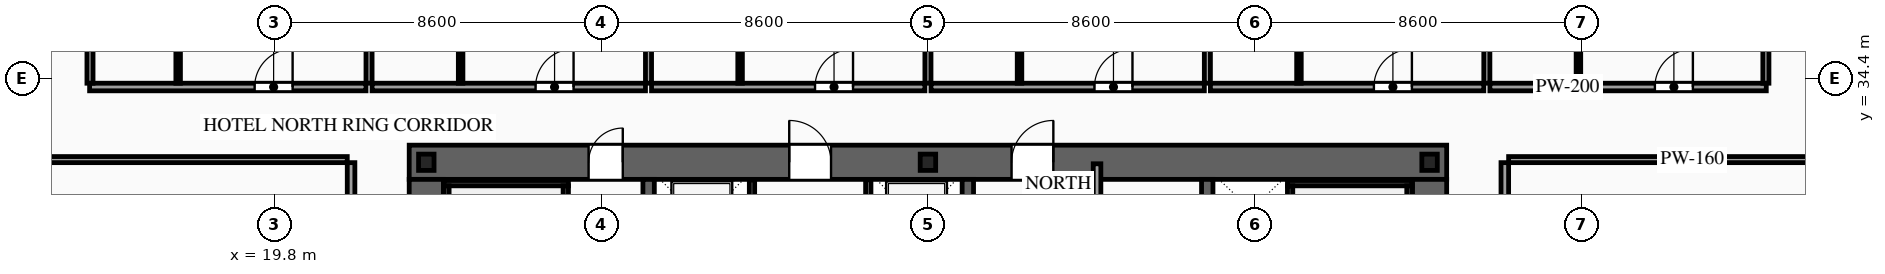
"""IFC4 building model, lengths in metres.
Left out: names, types, materials, properties, quantities, classifications, styles, units other than length and angle.
Written with IfcOpenShell. Run it as: python <this file> out.ifc"""

import sys

from ifc_helpers import new_model, si_unit, direction, frame, frame_2d, origin, origin_2d, place, context, subcontext, project, spatial, rectangle, i_section, extrude, source, transform, mapped, element, fill, save


model = new_model("IFC4")
c1 = context("Model", 3, precision=1e-05, world=origin(), true_north=direction((0.0, 1.0)))
c2 = subcontext(c1, "Body", "Model", "MODEL_VIEW")
j1 = project(units=[si_unit("LENGTHUNIT", "METRE"), si_unit("PLANEANGLEUNIT", "RADIAN")], contexts=[c1])
p1 = place(None, origin())
s1 = spatial("IfcSite", under=j1, at=p1, CompositionType="ELEMENT")
p2 = place(p1, origin())
s2 = spatial("IfcBuilding", under=s1, at=p2, CompositionType="ELEMENT")
p3 = place(p2, frame((0.0, 0.0, 30.6)))
s3 = spatial("IfcBuildingStorey", under=s2, at=p3, CompositionType="ELEMENT", Elevation=30.6)
p4 = place(p3, frame((23.35, 32.2, 0.0), z_axis=(0.0, 0.0, 1.0), x_axis=(1.0, 0.0, 0.0)))
e1 = element("IfcWall", 1, at=p4, inside=s3, PredefinedType="SHEAR", context=c2, shape_type="SweptSolid", body=[
    extrude(rectangle(XDim=27.3, YDim=0.9, at=frame_2d((13.65, 0.0))), origin(), (0.0, 0.0, 1.0), 3.6),
])
p5 = place(p4, frame((4.72, 0.0, 0.0)))
e2 = element("IfcOpeningElement", 2, at=p5, cuts=e1, PredefinedType="OPENING", context=c2, shape_type="SweptSolid", body=[
    extrude(rectangle(XDim=0.9, YDim=2.15, at=frame_2d((0.45, 1.075))), frame((0.0, 0.465, 0.0), z_axis=(0.0, -1.0, 0.0), x_axis=(1.0, 0.0, 0.0)), (0.0, 0.0, 1.0), 0.93),
])
p6 = place(p4, frame((10.0, 0.0, 0.0)))
e3 = element("IfcOpeningElement", 3, at=p6, cuts=e1, PredefinedType="OPENING", context=c2, shape_type="SweptSolid", body=[
    extrude(rectangle(XDim=1.1, YDim=2.2, at=frame_2d((0.55, 1.1))), frame((0.0, 0.465, 0.0), z_axis=(0.0, -1.0, 0.0), x_axis=(1.0, 0.0, 0.0)), (0.0, 0.0, 1.0), 0.93),
])
p7 = place(p4, frame((15.85, 0.0, 0.0)))
e4 = element("IfcOpeningElement", 4, at=p7, cuts=e1, PredefinedType="OPENING", context=c2, shape_type="SweptSolid", body=[
    extrude(rectangle(XDim=1.1, YDim=2.2, at=frame_2d((0.55, 1.1))), frame((0.0, 0.465, 0.0), z_axis=(0.0, -1.0, 0.0), x_axis=(1.0, 0.0, 0.0)), (0.0, 0.0, 1.0), 0.93),
])
m1 = source(origin(), c2, "Body", "SweptSolid", [
    extrude(rectangle(XDim=11.9, YDim=0.9, at=frame_2d((5.95, 0.0))), origin(), (0.0, 0.0, 1.0), 3.6),
])
for number, where, z_axis, x_axis in (
    (5, (23.8, 19.85, 0.0), (0.0, 0.0, 1.0), (0.0, 1.0, 0.0)),
    (6, (50.2, 19.85, 0.0), (0.0, 0.0, 1.0), (0.0, 1.0, 0.0)),
):
    element("IfcWall", number, at=place(p3, frame(where, z_axis=z_axis, x_axis=x_axis)), inside=s3, PredefinedType="SHEAR", context=c2, shape_type="MappedRepresentation", body=[
        mapped(m1, transform((0.0, 0.0, 0.0), scale=1.0)),
    ])
m2 = source(origin(), c2, "Body", "SweptSolid", [
    extrude(rectangle(XDim=11.9, YDim=0.3, at=frame_2d((5.95, 0.0))), origin(), (0.0, 0.0, 1.0), 3.6),
])
for number, where, z_axis, x_axis in (
    (7, (29.65, 19.85, 0.0), (0.0, 0.0, 1.0), (0.0, 1.0, 0.0)),
    (8, (38.05, 19.85, 0.0), (0.0, 0.0, 1.0), (0.0, 1.0, 0.0)),
    (9, (44.35, 19.85, 0.0), (0.0, 0.0, 1.0), (0.0, 1.0, 0.0)),
):
    element("IfcWall", number, at=place(p3, frame(where, z_axis=z_axis, x_axis=x_axis)), inside=s3, PredefinedType="SOLIDWALL", context=c2, shape_type="MappedRepresentation", body=[
        mapped(m2, transform((0.0, 0.0, 0.0), scale=1.0)),
    ])
m3 = source(origin(), c2, "Body", "SweptSolid", [
    extrude(i_section(OverallWidth=0.407, OverallDepth=0.428, WebThickness=0.02, FlangeThickness=0.035, at=origin_2d()), origin(), (0.0, 0.0, 1.0), 3.6),
])
for number, where, z_axis, x_axis in (
    (10, (23.8, 32.2, 0.0), (0.0, 0.0, 1.0), (1.0, 0.0, 0.0)),
    (11, (37.0, 32.2, 0.0), (0.0, 0.0, 1.0), (1.0, 0.0, 0.0)),
    (12, (50.2, 32.2, 0.0), (0.0, 0.0, 1.0), (1.0, 0.0, 0.0)),
):
    element("IfcColumn", number, at=place(p3, frame(where, z_axis=z_axis, x_axis=x_axis)), inside=s3, PredefinedType="COLUMN", context=c2, shape_type="MappedRepresentation", body=[
        mapped(m3, transform((0.0, 0.0, 0.0), scale=1.0)),
    ])
p8 = place(p3, frame((32.37, 29.4, 0.0), z_axis=(0.0, 0.0, 1.0), x_axis=(0.0, 1.0, 0.0)))
e13 = element("IfcWall", 13, at=p8, inside=s3, PredefinedType="SOLIDWALL", context=c2, shape_type="SweptSolid", body=[
    extrude(rectangle(XDim=2.34, YDim=0.14, at=frame_2d((1.17, 0.0))), origin(), (0.0, 0.0, 1.0), 3.38),
])
p9 = place(p8, frame((0.62, 0.0, 0.0)))
e14 = element("IfcOpeningElement", 14, at=p9, cuts=e13, PredefinedType="OPENING", context=c2, shape_type="SweptSolid", body=[
    extrude(rectangle(XDim=1.1, YDim=2.2, at=frame_2d((0.55, 1.1))), frame((0.0, 0.085, 0.0), z_axis=(0.0, -1.0, 0.0), x_axis=(1.0, 0.0, 0.0)), (0.0, 0.0, 1.0), 0.17),
])
p10 = place(p3, frame((35.43, 29.4, 0.0), z_axis=(0.0, 0.0, 1.0), x_axis=(0.0, 1.0, 0.0)))
e15 = element("IfcWall", 15, at=p10, inside=s3, PredefinedType="SOLIDWALL", context=c2, shape_type="SweptSolid", body=[
    extrude(rectangle(XDim=2.34, YDim=0.14, at=frame_2d((1.17, 0.0))), origin(), (0.0, 0.0, 1.0), 3.38),
])
p11 = place(p10, frame((0.62, 0.0, 0.0)))
e16 = element("IfcOpeningElement", 16, at=p11, cuts=e15, PredefinedType="OPENING", context=c2, shape_type="SweptSolid", body=[
    extrude(rectangle(XDim=1.1, YDim=2.2, at=frame_2d((0.55, 1.1))), frame((0.0, 0.085, 0.0), z_axis=(0.0, -1.0, 0.0), x_axis=(1.0, 0.0, 0.0)), (0.0, 0.0, 1.0), 0.17),
])
m4 = source(origin(), c2, "Body", "SweptSolid", [
    extrude(rectangle(XDim=3.28, YDim=0.14, at=frame_2d((1.64, 0.0))), origin(), (0.0, 0.0, 1.0), 3.38),
])
p12 = place(p3, frame((24.26, 31.65, 0.0), z_axis=(0.0, 0.0, 1.0), x_axis=(1.0, 0.0, 0.0)))
e17 = element("IfcWall", 17, at=p12, inside=s3, PredefinedType="SOLIDWALL", context=c2, shape_type="MappedRepresentation", body=[
    mapped(m4, transform((0.0, 0.0, 0.0), scale=1.0)),
])
m5 = source(origin(), c2, "Body", "SweptSolid", [
    extrude(rectangle(XDim=8.94, YDim=0.14, at=frame_2d((4.47, 0.0))), origin(), (0.0, 0.0, 1.0), 3.38),
])
for number, where, z_axis, x_axis in (
    (18, (24.33, 22.64, 0.0), (0.0, 0.0, 1.0), (0.0, 1.0, 0.0)),
    (19, (27.47, 22.64, 0.0), (0.0, 0.0, 1.0), (0.0, 1.0, 0.0)),
):
    element("IfcWall", number, at=place(p3, frame(where, z_axis=z_axis, x_axis=x_axis)), inside=s3, PredefinedType="SOLIDWALL", context=c2, shape_type="MappedRepresentation", body=[
        mapped(m5, transform((0.0, 0.0, 0.0), scale=1.0)),
    ])
p13 = place(p3, frame((46.46, 31.65, 0.0), z_axis=(0.0, 0.0, 1.0), x_axis=(1.0, 0.0, 0.0)))
e20 = element("IfcWall", 20, at=p13, inside=s3, PredefinedType="SOLIDWALL", context=c2, shape_type="MappedRepresentation", body=[
    mapped(m4, transform((0.0, 0.0, 0.0), scale=1.0)),
])
for number, where, z_axis, x_axis in (
    (21, (46.53, 22.64, 0.0), (0.0, 0.0, 1.0), (0.0, 1.0, 0.0)),
    (22, (49.67, 22.64, 0.0), (0.0, 0.0, 1.0), (0.0, 1.0, 0.0)),
):
    element("IfcWall", number, at=place(p3, frame(where, z_axis=z_axis, x_axis=x_axis)), inside=s3, PredefinedType="SOLIDWALL", context=c2, shape_type="MappedRepresentation", body=[
        mapped(m5, transform((0.0, 0.0, 0.0), scale=1.0)),
    ])
m6 = source(origin(), c2, "Body", "SweptSolid", [
    extrude(rectangle(XDim=12.72, YDim=0.2, at=frame_2d((6.36, 0.0))), origin(), (0.0, 0.0, 1.0), 3.38),
])
p14 = place(p3, frame((41.45, 19.44, 0.0), z_axis=(0.0, 0.0, 1.0), x_axis=(0.0, 1.0, 0.0)))
e23 = element("IfcWall", 23, at=p14, inside=s3, PredefinedType="PARTITIONING", context=c2, shape_type="MappedRepresentation", body=[
    mapped(m6, transform((0.0, 0.0, 0.0), scale=1.0)),
])
p15 = place(p3, frame((14.94, 34.18, 0.0), z_axis=(0.0, 0.0, 1.0), x_axis=(1.0, 0.0, 0.0)))
e24 = element("IfcWall", 24, at=p15, inside=s3, PredefinedType="PARTITIONING", context=c2, shape_type="SweptSolid", body=[
    extrude(rectangle(XDim=7.273, YDim=0.2, at=frame_2d((3.636, 0.0))), origin(), (0.0, 0.0, 1.0), 3.38),
])
p16 = place(p15, frame((4.342, 0.0, 0.0)))
e25 = element("IfcOpeningElement", 25, at=p16, cuts=e24, PredefinedType="OPENING", context=c2, shape_type="SweptSolid", body=[
    extrude(rectangle(XDim=1.0, YDim=2.2, at=frame_2d((0.5, 1.1))), frame((0.0, 0.115, 0.0), z_axis=(0.0, -1.0, 0.0), x_axis=(1.0, 0.0, 0.0)), (0.0, 0.0, 1.0), 0.23),
])
m7 = source(origin(), c2, "Body", "SweptSolid", [
    extrude(rectangle(XDim=16.47, YDim=0.16, at=frame_2d((8.235, 0.0))), origin(), (0.0, 0.0, 1.0), 3.38),
])
p17 = place(p3, frame((22.293, 34.28, 0.0), z_axis=(0.0, 0.0, 1.0), x_axis=(0.0, 1.0, 0.0)))
e26 = element("IfcWall", 26, at=p17, inside=s3, PredefinedType="PARTITIONING", context=c2, shape_type="MappedRepresentation", body=[
    mapped(m7, transform((0.0, 0.0, 0.0), scale=1.0)),
])
m8 = source(origin(), c2, "Body", "SweptSolid", [
    extrude(rectangle(XDim=2.42, YDim=0.12, at=frame_2d((1.21, 0.0))), origin(), (0.0, 0.0, 1.0), 3.38),
])
p18 = place(p3, frame((17.27, 34.28, 0.0), z_axis=(0.0, 0.0, 1.0), x_axis=(0.0, 1.0, 0.0)))
e27 = element("IfcWall", 27, at=p18, inside=s3, PredefinedType="PARTITIONING", context=c2, shape_type="MappedRepresentation", body=[
    mapped(m8, transform((0.0, 0.0, 0.0), scale=1.0)),
])
p19 = place(p3, frame((22.373, 34.18, 0.0), z_axis=(0.0, 0.0, 1.0), x_axis=(1.0, 0.0, 0.0)))
e28 = element("IfcWall", 28, at=p19, inside=s3, PredefinedType="PARTITIONING", context=c2, shape_type="SweptSolid", body=[
    extrude(rectangle(XDim=7.194, YDim=0.2, at=frame_2d((3.597, 0.0))), origin(), (0.0, 0.0, 1.0), 3.38),
])
p20 = place(p19, frame((4.302, 0.0, 0.0)))
e29 = element("IfcOpeningElement", 29, at=p20, cuts=e28, PredefinedType="OPENING", context=c2, shape_type="SweptSolid", body=[
    extrude(rectangle(XDim=1.0, YDim=2.2, at=frame_2d((0.5, 1.1))), frame((0.0, 0.115, 0.0), z_axis=(0.0, -1.0, 0.0), x_axis=(1.0, 0.0, 0.0)), (0.0, 0.0, 1.0), 0.23),
])
p21 = place(p3, frame((29.647, 34.28, 0.0), z_axis=(0.0, 0.0, 1.0), x_axis=(0.0, 1.0, 0.0)))
e30 = element("IfcWall", 30, at=p21, inside=s3, PredefinedType="PARTITIONING", context=c2, shape_type="MappedRepresentation", body=[
    mapped(m7, transform((0.0, 0.0, 0.0), scale=1.0)),
])
p22 = place(p3, frame((24.703, 34.28, 0.0), z_axis=(0.0, 0.0, 1.0), x_axis=(0.0, 1.0, 0.0)))
e31 = element("IfcWall", 31, at=p22, inside=s3, PredefinedType="PARTITIONING", context=c2, shape_type="MappedRepresentation", body=[
    mapped(m8, transform((0.0, 0.0, 0.0), scale=1.0)),
])
p23 = place(p3, frame((29.727, 34.18, 0.0), z_axis=(0.0, 0.0, 1.0), x_axis=(1.0, 0.0, 0.0)))
e32 = element("IfcWall", 32, at=p23, inside=s3, PredefinedType="PARTITIONING", context=c2, shape_type="SweptSolid", body=[
    extrude(rectangle(XDim=7.193, YDim=0.2, at=frame_2d((3.596, 0.0))), origin(), (0.0, 0.0, 1.0), 3.38),
])
p24 = place(p23, frame((4.302, 0.0, 0.0)))
e33 = element("IfcOpeningElement", 33, at=p24, cuts=e32, PredefinedType="OPENING", context=c2, shape_type="SweptSolid", body=[
    extrude(rectangle(XDim=1.0, YDim=2.2, at=frame_2d((0.5, 1.1))), frame((0.0, 0.115, 0.0), z_axis=(0.0, -1.0, 0.0), x_axis=(1.0, 0.0, 0.0)), (0.0, 0.0, 1.0), 0.23),
])
m9 = source(origin(), c2, "Body", "SweptSolid", [
    extrude(rectangle(XDim=16.47, YDim=0.16, at=frame_2d((8.235, 0.0))), origin(), (0.0, 0.0, 1.0), 2.575),
])
p25 = place(p3, frame((37.0, 34.28, 0.0), z_axis=(0.0, 0.0, 1.0), x_axis=(0.0, 1.0, 0.0)))
e34 = element("IfcWall", 34, at=p25, inside=s3, PredefinedType="PARTITIONING", context=c2, shape_type="MappedRepresentation", body=[
    mapped(m9, transform((0.0, 0.0, 0.0), scale=1.0)),
])
p26 = place(p3, frame((32.057, 34.28, 0.0), z_axis=(0.0, 0.0, 1.0), x_axis=(0.0, 1.0, 0.0)))
e35 = element("IfcWall", 35, at=p26, inside=s3, PredefinedType="PARTITIONING", context=c2, shape_type="MappedRepresentation", body=[
    mapped(m8, transform((0.0, 0.0, 0.0), scale=1.0)),
])
p27 = place(p3, frame((37.08, 34.18, 0.0), z_axis=(0.0, 0.0, 1.0), x_axis=(1.0, 0.0, 0.0)))
e36 = element("IfcWall", 36, at=p27, inside=s3, PredefinedType="PARTITIONING", context=c2, shape_type="SweptSolid", body=[
    extrude(rectangle(XDim=7.193, YDim=0.2, at=frame_2d((3.596, 0.0))), origin(), (0.0, 0.0, 1.0), 3.38),
])
p28 = place(p27, frame((4.302, 0.0, 0.0)))
e37 = element("IfcOpeningElement", 37, at=p28, cuts=e36, PredefinedType="OPENING", context=c2, shape_type="SweptSolid", body=[
    extrude(rectangle(XDim=1.0, YDim=2.2, at=frame_2d((0.5, 1.1))), frame((0.0, 0.115, 0.0), z_axis=(0.0, -1.0, 0.0), x_axis=(1.0, 0.0, 0.0)), (0.0, 0.0, 1.0), 0.23),
])
p29 = place(p3, frame((44.353, 34.28, 0.0), z_axis=(0.0, 0.0, 1.0), x_axis=(0.0, 1.0, 0.0)))
e38 = element("IfcWall", 38, at=p29, inside=s3, PredefinedType="PARTITIONING", context=c2, shape_type="MappedRepresentation", body=[
    mapped(m7, transform((0.0, 0.0, 0.0), scale=1.0)),
])
p30 = place(p3, frame((39.41, 34.28, 0.0), z_axis=(0.0, 0.0, 1.0), x_axis=(0.0, 1.0, 0.0)))
e39 = element("IfcWall", 39, at=p30, inside=s3, PredefinedType="PARTITIONING", context=c2, shape_type="MappedRepresentation", body=[
    mapped(m8, transform((0.0, 0.0, 0.0), scale=1.0)),
])
p31 = place(p3, frame((44.433, 34.18, 0.0), z_axis=(0.0, 0.0, 1.0), x_axis=(1.0, 0.0, 0.0)))
e40 = element("IfcWall", 40, at=p31, inside=s3, PredefinedType="PARTITIONING", context=c2, shape_type="SweptSolid", body=[
    extrude(rectangle(XDim=7.194, YDim=0.2, at=frame_2d((3.597, 0.0))), origin(), (0.0, 0.0, 1.0), 3.38),
])
p32 = place(p31, frame((4.302, 0.0, 0.0)))
e41 = element("IfcOpeningElement", 41, at=p32, cuts=e40, PredefinedType="OPENING", context=c2, shape_type="SweptSolid", body=[
    extrude(rectangle(XDim=1.0, YDim=2.2, at=frame_2d((0.5, 1.1))), frame((0.0, 0.115, 0.0), z_axis=(0.0, -1.0, 0.0), x_axis=(1.0, 0.0, 0.0)), (0.0, 0.0, 1.0), 0.23),
])
p33 = place(p3, frame((51.707, 34.28, 0.0), z_axis=(0.0, 0.0, 1.0), x_axis=(0.0, 1.0, 0.0)))
e42 = element("IfcWall", 42, at=p33, inside=s3, PredefinedType="PARTITIONING", context=c2, shape_type="MappedRepresentation", body=[
    mapped(m7, transform((0.0, 0.0, 0.0), scale=1.0)),
])
p34 = place(p3, frame((46.763, 34.28, 0.0), z_axis=(0.0, 0.0, 1.0), x_axis=(0.0, 1.0, 0.0)))
e43 = element("IfcWall", 43, at=p34, inside=s3, PredefinedType="PARTITIONING", context=c2, shape_type="MappedRepresentation", body=[
    mapped(m8, transform((0.0, 0.0, 0.0), scale=1.0)),
])
p35 = place(p3, frame((51.787, 34.18, 0.0), z_axis=(0.0, 0.0, 1.0), x_axis=(1.0, 0.0, 0.0)))
e44 = element("IfcWall", 44, at=p35, inside=s3, PredefinedType="PARTITIONING", context=c2, shape_type="SweptSolid", body=[
    extrude(rectangle(XDim=7.273, YDim=0.2, at=frame_2d((3.636, 0.0))), origin(), (0.0, 0.0, 1.0), 3.38),
])
p36 = place(p35, frame((4.342, 0.0, 0.0)))
e45 = element("IfcOpeningElement", 45, at=p36, cuts=e44, PredefinedType="OPENING", context=c2, shape_type="SweptSolid", body=[
    extrude(rectangle(XDim=1.0, YDim=2.2, at=frame_2d((0.5, 1.1))), frame((0.0, 0.115, 0.0), z_axis=(0.0, -1.0, 0.0), x_axis=(1.0, 0.0, 0.0)), (0.0, 0.0, 1.0), 0.23),
])
m10 = source(origin(), c2, "Body", "SweptSolid", [
    extrude(rectangle(XDim=16.32, YDim=0.16, at=frame_2d((8.16, 0.0))), origin(), (0.0, 0.0, 1.0), 3.38),
])
for number, where, z_axis, x_axis in (
    (46, (14.95, 34.28, 0.0), (0.0, 0.0, 1.0), (0.0, 1.0, 0.0)),
    (47, (59.05, 34.28, 0.0), (0.0, 0.0, 1.0), (0.0, 1.0, 0.0)),
):
    element("IfcWall", number, at=place(p3, frame(where, z_axis=z_axis, x_axis=x_axis)), inside=s3, PredefinedType="PARTITIONING", context=c2, shape_type="MappedRepresentation", body=[
        mapped(m10, transform((0.0, 0.0, 0.0), scale=1.0)),
    ])
p37 = place(p3, frame((54.117, 34.28, 0.0), z_axis=(0.0, 0.0, 1.0), x_axis=(0.0, 1.0, 0.0)))
e48 = element("IfcWall", 48, at=p37, inside=s3, PredefinedType="PARTITIONING", context=c2, shape_type="MappedRepresentation", body=[
    mapped(m8, transform((0.0, 0.0, 0.0), scale=1.0)),
])
p38 = place(p3, frame((21.82, 25.88, 0.0), z_axis=(0.0, 0.0, 1.0), x_axis=(0.0, 1.0, 0.0)))
e49 = element("IfcWall", 49, at=p38, inside=s3, PredefinedType="PARTITIONING", context=c2, shape_type="SweptSolid", body=[
    extrude(rectangle(XDim=6.31, YDim=0.2, at=frame_2d((3.155, 0.0))), origin(), (0.0, 0.0, 1.0), 3.38),
])
p39 = place(p38, frame((3.835, 0.0, 0.0)))
e50 = element("IfcOpeningElement", 50, at=p39, cuts=e49, PredefinedType="OPENING", context=c2, shape_type="SweptSolid", body=[
    extrude(rectangle(XDim=1.0, YDim=2.2, at=frame_2d((0.5, 1.1))), frame((0.0, 0.115, 0.0), z_axis=(0.0, -1.0, 0.0), x_axis=(1.0, 0.0, 0.0)), (0.0, 0.0, 1.0), 0.23),
])
m11 = source(origin(), c2, "Body", "SweptSolid", [
    extrude(rectangle(XDim=9.67, YDim=0.16, at=frame_2d((4.835, 0.0))), origin(), (0.0, 0.0, 1.0), 2.875),
])
p40 = place(p3, frame((12.05, 32.27, 0.0), z_axis=(0.0, 0.0, 1.0), x_axis=(1.0, 0.0, 0.0)))
e51 = element("IfcWall", 51, at=p40, inside=s3, PredefinedType="PARTITIONING", context=c2, shape_type="MappedRepresentation", body=[
    mapped(m11, transform((0.0, 0.0, 0.0), scale=1.0)),
])
p41 = place(p3, frame((52.18, 25.88, 0.0), z_axis=(0.0, 0.0, 1.0), x_axis=(0.0, 1.0, 0.0)))
e52 = element("IfcWall", 52, at=p41, inside=s3, PredefinedType="PARTITIONING", context=c2, shape_type="SweptSolid", body=[
    extrude(rectangle(XDim=6.31, YDim=0.2, at=frame_2d((3.155, 0.0))), origin(), (0.0, 0.0, 1.0), 3.38),
])
p42 = place(p41, frame((3.835, 0.0, 0.0)))
e53 = element("IfcOpeningElement", 53, at=p42, cuts=e52, PredefinedType="OPENING", context=c2, shape_type="SweptSolid", body=[
    extrude(rectangle(XDim=1.0, YDim=2.2, at=frame_2d((0.5, 1.1))), frame((0.0, 0.115, 0.0), z_axis=(0.0, -1.0, 0.0), x_axis=(1.0, 0.0, 0.0)), (0.0, 0.0, 1.0), 0.23),
])
p43 = place(p3, frame((52.28, 32.27, 0.0), z_axis=(0.0, 0.0, 1.0), x_axis=(1.0, 0.0, 0.0)))
e54 = element("IfcWall", 54, at=p43, inside=s3, PredefinedType="PARTITIONING", context=c2, shape_type="MappedRepresentation", body=[
    mapped(m11, transform((0.0, 0.0, 0.0), scale=1.0)),
])
m12 = source(origin(), c2, "Body", "SweptSolid", [
    extrude(rectangle(XDim=0.9, YDim=2.15, at=frame_2d((0.45, 1.075))), frame((0.0, 0.025, 0.0), z_axis=(0.0, -1.0, 0.0), x_axis=(1.0, 0.0, 0.0)), (0.0, 0.0, 1.0), 0.05),
])
p44 = place(p5, origin())
e55 = element("IfcDoor", 55, at=p44, inside=s3, OperationType="SINGLE_SWING_RIGHT", PredefinedType="DOOR", context=c2, shape_type="MappedRepresentation", body=[
    mapped(m12, transform((0.0, 0.0, 0.0), scale=1.0)),
])
fill(e2, e55)
m13 = source(origin(), c2, "Body", "SweptSolid", [
    extrude(rectangle(XDim=1.1, YDim=2.2, at=frame_2d((0.55, 1.1))), frame((0.0, 0.025, 0.0), z_axis=(0.0, -1.0, 0.0), x_axis=(1.0, 0.0, 0.0)), (0.0, 0.0, 1.0), 0.05),
])
p45 = place(p6, origin())
e56 = element("IfcDoor", 56, at=p45, inside=s3, OperationType="SINGLE_SWING_LEFT", PredefinedType="DOOR", context=c2, shape_type="MappedRepresentation", body=[
    mapped(m13, transform((0.0, 0.0, 0.0), scale=1.0)),
])
fill(e3, e56)
p46 = place(p7, origin())
e57 = element("IfcDoor", 57, at=p46, inside=s3, OperationType="SINGLE_SWING_RIGHT", PredefinedType="DOOR", context=c2, shape_type="MappedRepresentation", body=[
    mapped(m13, transform((0.0, 0.0, 0.0), scale=1.0)),
])
fill(e4, e57)
m14 = source(origin(), c2, "Body", "SweptSolid", [
    extrude(rectangle(XDim=1.0, YDim=2.2, at=frame_2d((0.5, 1.1))), frame((0.0, 0.025, 0.0), z_axis=(0.0, -1.0, 0.0), x_axis=(1.0, 0.0, 0.0)), (0.0, 0.0, 1.0), 0.05),
])
p47 = place(p16, origin())
e58 = element("IfcDoor", 58, at=p47, inside=s3, OperationType="SINGLE_SWING_RIGHT", PredefinedType="DOOR", context=c2, shape_type="MappedRepresentation", body=[
    mapped(m14, transform((0.0, 0.0, 0.0), scale=1.0)),
])
fill(e25, e58)
p48 = place(p20, origin())
e59 = element("IfcDoor", 59, at=p48, inside=s3, OperationType="SINGLE_SWING_RIGHT", PredefinedType="DOOR", context=c2, shape_type="MappedRepresentation", body=[
    mapped(m14, transform((0.0, 0.0, 0.0), scale=1.0)),
])
fill(e29, e59)
p49 = place(p24, origin())
e60 = element("IfcDoor", 60, at=p49, inside=s3, OperationType="SINGLE_SWING_RIGHT", PredefinedType="DOOR", context=c2, shape_type="MappedRepresentation", body=[
    mapped(m14, transform((0.0, 0.0, 0.0), scale=1.0)),
])
fill(e33, e60)
p50 = place(p28, origin())
e61 = element("IfcDoor", 61, at=p50, inside=s3, OperationType="SINGLE_SWING_RIGHT", PredefinedType="DOOR", context=c2, shape_type="MappedRepresentation", body=[
    mapped(m14, transform((0.0, 0.0, 0.0), scale=1.0)),
])
fill(e37, e61)
p51 = place(p32, origin())
e62 = element("IfcDoor", 62, at=p51, inside=s3, OperationType="SINGLE_SWING_RIGHT", PredefinedType="DOOR", context=c2, shape_type="MappedRepresentation", body=[
    mapped(m14, transform((0.0, 0.0, 0.0), scale=1.0)),
])
fill(e41, e62)
p52 = place(p36, origin())
e63 = element("IfcDoor", 63, at=p52, inside=s3, OperationType="SINGLE_SWING_RIGHT", PredefinedType="DOOR", context=c2, shape_type="MappedRepresentation", body=[
    mapped(m14, transform((0.0, 0.0, 0.0), scale=1.0)),
])
fill(e45, e63)
save(model, sys.argv[1])
